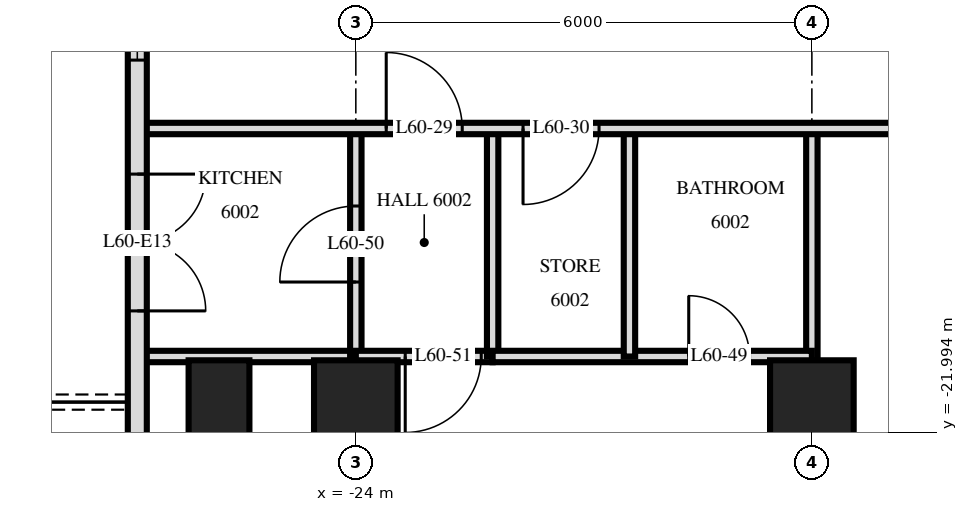
"""IFC4 building model, lengths in metres.
Left out: names, types, materials, properties, quantities, classifications, styles, units other than length and angle.
Written with IfcOpenShell. Run it as: python <this file> out.ifc"""

import sys

from ifc_helpers import new_model, si_unit, direction, frame, frame_2d, origin, origin_2d, place, context, subcontext, project, spatial, rectangle, extrude, element, fill, save


model = new_model("IFC4")
c1 = context("Model", 3, precision=1e-05, world=origin(), true_north=direction((0.0, 1.0)))
c2 = subcontext(c1, "Body", "Model", "MODEL_VIEW")
j1 = project(units=[si_unit("LENGTHUNIT", "METRE"), si_unit("PLANEANGLEUNIT", "RADIAN")], contexts=[c1])
p1 = place(None, origin())
s1 = spatial("IfcSite", under=j1, at=p1, CompositionType="ELEMENT")
p2 = place(p1, origin())
s2 = spatial("IfcBuilding", under=s1, at=p2, CompositionType="ELEMENT")
p3 = place(p2, frame((0.0, 0.0, 229.1)))
s3 = spatial("IfcBuildingStorey", under=s2, at=p3, CompositionType="ELEMENT", Elevation=229.1)
p4 = place(p3, frame((-25.8, -21.6, 0.0), z_axis=(0.0, 0.0, 1.0), x_axis=(0.0, 1.0, 0.0)))
e1 = element("IfcColumn", 1, at=p4, inside=s3, PredefinedType="COLUMN", context=c2, shape_type="SweptSolid", body=[
    extrude(rectangle(XDim=1.1, YDim=0.8, at=origin_2d()), origin(), (0.0, 0.0, 1.0), 3.5),
])
for number, where, z_axis, x_axis in (
    (2, (-24.0, -21.6, 0.0), (0.0, 0.0, 1.0), (1.0, 0.0, 0.0)),
    (3, (-18.0, -21.6, 0.0), (0.0, 0.0, 1.0), (1.0, 0.0, 0.0)),
):
    element("IfcColumn", number, at=place(p3, frame(where, z_axis=z_axis, x_axis=x_axis)), inside=s3, PredefinedType="COLUMN", context=c2, shape_type="SweptSolid", body=[
        extrude(rectangle(XDim=1.1, YDim=1.1, at=origin_2d()), origin(), (0.0, 0.0, 1.0), 3.5),
    ])
p5 = place(p3, frame((-26.875, -3.325, 0.0), z_axis=(0.0, 0.0, 1.0), x_axis=(0.0, -1.0, 0.0)))
e4 = element("IfcWall", 4, at=p5, inside=s3, PredefinedType="SOLIDWALL", context=c2, shape_type="SweptSolid", body=[
    extrude(rectangle(XDim=21.551, YDim=0.25, at=frame_2d((10.775, 0.0))), origin(), (0.0, 0.0, 1.0), 3.22),
])
p6 = place(p5, frame((6.575, 0.0, 0.0)))
e5 = element("IfcOpeningElement", 5, at=p6, cuts=e4, PredefinedType="OPENING", context=c2, shape_type="SweptSolid", body=[
    extrude(rectangle(XDim=1.8, YDim=2.4, at=frame_2d((0.9, 1.2))), frame((0.0, 0.135, 0.0), z_axis=(0.0, -1.0, 0.0), x_axis=(1.0, 0.0, 0.0)), (0.0, 0.0, 1.0), 0.27),
])
p7 = place(p5, frame((9.425, 0.0, 0.9)))
e6 = element("IfcOpeningElement", 6, at=p7, cuts=e4, PredefinedType="OPENING", context=c2, shape_type="SweptSolid", body=[
    extrude(rectangle(XDim=1.8, YDim=1.5, at=frame_2d((0.9, 0.75))), frame((0.0, 0.135, 0.0), z_axis=(0.0, -1.0, 0.0), x_axis=(1.0, 0.0, 0.0)), (0.0, 0.0, 1.0), 0.27),
])
p8 = place(p5, frame((12.575, 0.0, 0.9)))
e7 = element("IfcOpeningElement", 7, at=p8, cuts=e4, PredefinedType="OPENING", context=c2, shape_type="SweptSolid", body=[
    extrude(rectangle(XDim=1.2, YDim=1.5, at=frame_2d((0.6, 0.75))), frame((0.0, 0.135, 0.0), z_axis=(0.0, -1.0, 0.0), x_axis=(1.0, 0.0, 0.0)), (0.0, 0.0, 1.0), 0.27),
])
p9 = place(p5, frame((15.275, 0.0, 0.0)))
e8 = element("IfcOpeningElement", 8, at=p9, cuts=e4, PredefinedType="OPENING", context=c2, shape_type="SweptSolid", body=[
    extrude(rectangle(XDim=1.8, YDim=2.4, at=frame_2d((0.9, 1.2))), frame((0.0, 0.135, 0.0), z_axis=(0.0, -1.0, 0.0), x_axis=(1.0, 0.0, 0.0)), (0.0, 0.0, 1.0), 0.27),
])
p10 = place(p5, frame((18.875, 0.0, 0.0)))
e9 = element("IfcOpeningElement", 9, at=p10, cuts=e4, PredefinedType="OPENING", context=c2, shape_type="SweptSolid", body=[
    extrude(rectangle(XDim=1.8, YDim=2.4, at=frame_2d((0.9, 1.2))), frame((0.0, 0.135, 0.0), z_axis=(0.0, -1.0, 0.0), x_axis=(1.0, 0.0, 0.0)), (0.0, 0.0, 1.0), 0.27),
])
p11 = place(p3, frame((-18.0, -29.22, 0.0), z_axis=(0.0, 0.0, 1.0), x_axis=(0.0, 1.0, 0.0)))
e10 = element("IfcWall", 10, at=p11, inside=s3, PredefinedType="PARTITIONING", context=c2, shape_type="SweptSolid", body=[
    extrude(rectangle(XDim=11.22, YDim=0.15, at=frame_2d((5.61, 0.0))), origin(), (0.0, 0.0, 1.0), 3.22),
])
for number, where, z_axis, x_axis in (
    (11, (-20.4, -21.0, 0.0), (0.0, 0.0, 1.0), (0.0, 1.0, 0.0)),
    (12, (-22.2, -21.0, 0.0), (0.0, 0.0, 1.0), (0.0, 1.0, 0.0)),
):
    element("IfcWall", number, at=place(p3, frame(where, z_axis=z_axis, x_axis=x_axis)), inside=s3, PredefinedType="PARTITIONING", context=c2, shape_type="SweptSolid", body=[
        extrude(rectangle(XDim=3.0, YDim=0.15, at=frame_2d((1.5, 0.0))), origin(), (0.0, 0.0, 1.0), 3.22),
    ])
p12 = place(p3, frame((-24.0, -21.0, 0.0), z_axis=(0.0, 0.0, 1.0), x_axis=(0.0, 1.0, 0.0)))
e13 = element("IfcWall", 13, at=p12, inside=s3, PredefinedType="PARTITIONING", context=c2, shape_type="SweptSolid", body=[
    extrude(rectangle(XDim=3.0, YDim=0.15, at=frame_2d((1.5, 0.0))), origin(), (0.0, 0.0, 1.0), 3.22),
])
p13 = place(p12, frame((0.98, 0.0, 0.0)))
e14 = element("IfcOpeningElement", 14, at=p13, cuts=e13, PredefinedType="OPENING", context=c2, shape_type="SweptSolid", body=[
    extrude(rectangle(XDim=1.0, YDim=2.1, at=frame_2d((0.5, 1.05))), frame((0.0, 0.085, 0.0), z_axis=(0.0, -1.0, 0.0), x_axis=(1.0, 0.0, 0.0)), (0.0, 0.0, 1.0), 0.17),
])
p14 = place(p3, frame((-24.0, -28.918, 0.0), z_axis=(0.0, 0.0, 1.0), x_axis=(0.0, 1.0, 0.0)))
e15 = element("IfcWall", 15, at=p14, inside=s3, PredefinedType="PARTITIONING", context=c2, shape_type="SweptSolid", body=[
    extrude(rectangle(XDim=7.918, YDim=0.15, at=frame_2d((3.959, 0.0))), origin(), (0.0, 0.0, 1.0), 3.22),
])
p15 = place(p14, frame((3.436, 0.0, 0.0)))
e16 = element("IfcOpeningElement", 16, at=p15, cuts=e15, PredefinedType="OPENING", context=c2, shape_type="SweptSolid", body=[
    extrude(rectangle(XDim=0.9, YDim=2.1, at=frame_2d((0.45, 1.05))), frame((0.0, 0.085, 0.0), z_axis=(0.0, -1.0, 0.0), x_axis=(1.0, 0.0, 0.0)), (0.0, 0.0, 1.0), 0.17),
])
p16 = place(p3, frame((-24.0, -21.0, 0.0), z_axis=(0.0, 0.0, 1.0), x_axis=(1.0, 0.0, 0.0)))
e17 = element("IfcWall", 17, at=p16, inside=s3, PredefinedType="PARTITIONING", context=c2, shape_type="SweptSolid", body=[
    extrude(rectangle(XDim=1.8, YDim=0.15, at=frame_2d((0.9, 0.0))), origin(), (0.0, 0.0, 1.0), 3.22),
])
p17 = place(p16, frame((0.65, 0.0, 0.0)))
e18 = element("IfcOpeningElement", 18, at=p17, cuts=e17, PredefinedType="OPENING", context=c2, shape_type="SweptSolid", body=[
    extrude(rectangle(XDim=1.0, YDim=2.1, at=frame_2d((0.5, 1.05))), frame((0.0, 0.085, 0.0), z_axis=(0.0, -1.0, 0.0), x_axis=(1.0, 0.0, 0.0)), (0.0, 0.0, 1.0), 0.17),
])
p18 = place(p3, frame((-26.82, -21.0, 0.0), z_axis=(0.0, 0.0, 1.0), x_axis=(1.0, 0.0, 0.0)))
e19 = element("IfcWall", 19, at=p18, inside=s3, PredefinedType="PARTITIONING", context=c2, shape_type="SweptSolid", body=[
    extrude(rectangle(XDim=2.82, YDim=0.15, at=frame_2d((1.41, 0.0))), origin(), (0.0, 0.0, 1.0), 3.22),
])
p19 = place(p3, frame((-22.2, -21.0, 0.0), z_axis=(0.0, 0.0, 1.0), x_axis=(1.0, 0.0, 0.0)))
e20 = element("IfcWall", 20, at=p19, inside=s3, PredefinedType="PARTITIONING", context=c2, shape_type="SweptSolid", body=[
    extrude(rectangle(XDim=4.2, YDim=0.15, at=frame_2d((2.1, 0.0))), origin(), (0.0, 0.0, 1.0), 3.22),
])
p20 = place(p19, frame((2.58, 0.0, 0.0)))
e21 = element("IfcOpeningElement", 21, at=p20, cuts=e20, PredefinedType="OPENING", context=c2, shape_type="SweptSolid", body=[
    extrude(rectangle(XDim=0.8, YDim=2.1, at=frame_2d((0.4, 1.05))), frame((0.0, 0.085, 0.0), z_axis=(0.0, -1.0, 0.0), x_axis=(1.0, 0.0, 0.0)), (0.0, 0.0, 1.0), 0.17),
])
p21 = place(p3, frame((-26.82, -18.0, 0.0), z_axis=(0.0, 0.0, 1.0), x_axis=(1.0, 0.0, 0.0)))
e22 = element("IfcWall", 22, at=p21, inside=s3, PredefinedType="PARTITIONING", context=c2, shape_type="SweptSolid", body=[
    extrude(rectangle(XDim=53.64, YDim=0.15, at=frame_2d((26.82, 0.0))), origin(), (0.0, 0.0, 1.0), 3.22),
])
p22 = place(p21, frame((11.32, 0.0, 0.0)))
e23 = element("IfcOpeningElement", 23, at=p22, cuts=e22, PredefinedType="OPENING", context=c2, shape_type="SweptSolid", body=[
    extrude(rectangle(XDim=1.0, YDim=2.1, at=frame_2d((0.5, 1.05))), frame((0.0, 0.085, 0.0), z_axis=(0.0, -1.0, 0.0), x_axis=(1.0, 0.0, 0.0)), (0.0, 0.0, 1.0), 0.17),
])
p23 = place(p21, frame((3.22, 0.0, 0.0)))
e24 = element("IfcOpeningElement", 24, at=p23, cuts=e22, PredefinedType="OPENING", context=c2, shape_type="SweptSolid", body=[
    extrude(rectangle(XDim=1.0, YDim=2.1, at=frame_2d((0.5, 1.05))), frame((0.0, 0.085, 0.0), z_axis=(0.0, -1.0, 0.0), x_axis=(1.0, 0.0, 0.0)), (0.0, 0.0, 1.0), 0.17),
])
p24 = place(p21, frame((5.02, 0.0, 0.0)))
e25 = element("IfcOpeningElement", 25, at=p24, cuts=e22, PredefinedType="OPENING", context=c2, shape_type="SweptSolid", body=[
    extrude(rectangle(XDim=1.0, YDim=2.1, at=frame_2d((0.5, 1.05))), frame((0.0, 0.085, 0.0), z_axis=(0.0, -1.0, 0.0), x_axis=(1.0, 0.0, 0.0)), (0.0, 0.0, 1.0), 0.17),
])
p25 = place(p21, frame((38.97, 0.0, 0.0)))
e26 = element("IfcOpeningElement", 26, at=p25, cuts=e22, PredefinedType="OPENING", context=c2, shape_type="SweptSolid", body=[
    extrude(rectangle(XDim=1.0, YDim=2.1, at=frame_2d((0.5, 1.05))), frame((0.0, 0.085, 0.0), z_axis=(0.0, -1.0, 0.0), x_axis=(1.0, 0.0, 0.0)), (0.0, 0.0, 1.0), 0.17),
])
p26 = place(p21, frame((48.72, 0.0, 0.0)))
e27 = element("IfcOpeningElement", 27, at=p26, cuts=e22, PredefinedType="OPENING", context=c2, shape_type="SweptSolid", body=[
    extrude(rectangle(XDim=1.0, YDim=2.1, at=frame_2d((0.5, 1.05))), frame((0.0, 0.085, 0.0), z_axis=(0.0, -1.0, 0.0), x_axis=(1.0, 0.0, 0.0)), (0.0, 0.0, 1.0), 0.17),
])
p27 = place(p21, frame((46.92, 0.0, 0.0)))
e28 = element("IfcOpeningElement", 28, at=p27, cuts=e22, PredefinedType="OPENING", context=c2, shape_type="SweptSolid", body=[
    extrude(rectangle(XDim=1.0, YDim=2.1, at=frame_2d((0.5, 1.05))), frame((0.0, 0.085, 0.0), z_axis=(0.0, -1.0, 0.0), x_axis=(1.0, 0.0, 0.0)), (0.0, 0.0, 1.0), 0.17),
])
p28 = place(p21, frame((18.82, 0.0, 0.0)))
e29 = element("IfcOpeningElement", 29, at=p28, cuts=e22, PredefinedType="OPENING", context=c2, shape_type="SweptSolid", body=[
    extrude(rectangle(XDim=1.0, YDim=2.1, at=frame_2d((0.5, 1.05))), frame((0.0, 0.085, 0.0), z_axis=(0.0, -1.0, 0.0), x_axis=(1.0, 0.0, 0.0)), (0.0, 0.0, 1.0), 0.17),
])
p29 = place(p21, frame((27.82, 0.0, 0.0)))
e30 = element("IfcOpeningElement", 30, at=p29, cuts=e22, PredefinedType="OPENING", context=c2, shape_type="SweptSolid", body=[
    extrude(rectangle(XDim=1.0, YDim=2.1, at=frame_2d((0.5, 1.05))), frame((0.0, 0.085, 0.0), z_axis=(0.0, -1.0, 0.0), x_axis=(1.0, 0.0, 0.0)), (0.0, 0.0, 1.0), 0.17),
])
p30 = place(p21, frame((35.32, 0.0, 0.0)))
e31 = element("IfcOpeningElement", 31, at=p30, cuts=e22, PredefinedType="OPENING", context=c2, shape_type="SweptSolid", body=[
    extrude(rectangle(XDim=1.0, YDim=2.1, at=frame_2d((0.5, 1.05))), frame((0.0, 0.085, 0.0), z_axis=(0.0, -1.0, 0.0), x_axis=(1.0, 0.0, 0.0)), (0.0, 0.0, 1.0), 0.17),
])
p31 = place(p8, origin())
e32 = element("IfcWindow", 32, at=p31, inside=s3, PartitioningType="SINGLE_PANEL", PredefinedType="WINDOW", context=c2, shape_type="SweptSolid", body=[
    extrude(rectangle(XDim=1.2, YDim=1.5, at=frame_2d((0.6, 0.75))), frame((0.0, 0.03, 0.0), z_axis=(0.0, -1.0, 0.0), x_axis=(1.0, 0.0, 0.0)), (0.0, 0.0, 1.0), 0.06),
])
fill(e7, e32)
p32 = place(p9, origin())
e33 = element("IfcDoor", 33, at=p32, inside=s3, OperationType="DOUBLE_DOOR_SINGLE_SWING", PredefinedType="DOOR", context=c2, shape_type="SweptSolid", body=[
    extrude(rectangle(XDim=1.8, YDim=2.4, at=frame_2d((0.9, 1.2))), frame((0.0, 0.025, 0.0), z_axis=(0.0, -1.0, 0.0), x_axis=(1.0, 0.0, 0.0)), (0.0, 0.0, 1.0), 0.05),
])
fill(e8, e33)
p33 = place(p23, origin())
e34 = element("IfcDoor", 34, at=p33, inside=s3, OperationType="SINGLE_SWING_RIGHT", PredefinedType="DOOR", context=c2, shape_type="SweptSolid", body=[
    extrude(rectangle(XDim=1.0, YDim=2.1, at=frame_2d((0.5, 1.05))), frame((0.0, 0.025, 0.0), z_axis=(0.0, -1.0, 0.0), x_axis=(1.0, 0.0, 0.0)), (0.0, 0.0, 1.0), 0.05),
])
fill(e24, e34)
p34 = place(p24, frame((0.5, 0.0, 0.0), z_axis=(0.0, 0.0, 1.0), x_axis=(-1.0, 0.0, 0.0)))
e35 = element("IfcDoor", 35, at=p34, inside=s3, OperationType="SINGLE_SWING_LEFT", PredefinedType="DOOR", context=c2, shape_type="SweptSolid", body=[
    extrude(rectangle(XDim=1.0, YDim=2.1, at=frame_2d((0.0, 1.05))), frame((0.0, -0.025, 0.0), z_axis=(0.0, 1.0, 0.0), x_axis=(-1.0, 0.0, 0.0)), (0.0, 0.0, 1.0), 0.05),
])
fill(e25, e35)
p35 = place(p20, origin())
e36 = element("IfcDoor", 36, at=p35, inside=s3, OperationType="SINGLE_SWING_RIGHT", PredefinedType="DOOR", context=c2, shape_type="SweptSolid", body=[
    extrude(rectangle(XDim=0.8, YDim=2.1, at=frame_2d((0.4, 1.05))), frame((0.0, 0.025, 0.0), z_axis=(0.0, -1.0, 0.0), x_axis=(1.0, 0.0, 0.0)), (0.0, 0.0, 1.0), 0.05),
])
fill(e21, e36)
p36 = place(p13, origin())
e37 = element("IfcDoor", 37, at=p36, inside=s3, OperationType="SINGLE_SWING_RIGHT", PredefinedType="DOOR", context=c2, shape_type="SweptSolid", body=[
    extrude(rectangle(XDim=1.0, YDim=2.1, at=frame_2d((0.5, 1.05))), frame((0.0, 0.025, 0.0), z_axis=(0.0, -1.0, 0.0), x_axis=(1.0, 0.0, 0.0)), (0.0, 0.0, 1.0), 0.05),
])
fill(e14, e37)
p37 = place(p17, frame((0.5, 0.0, 0.0), z_axis=(0.0, 0.0, 1.0), x_axis=(-1.0, 0.0, 0.0)))
e38 = element("IfcDoor", 38, at=p37, inside=s3, OperationType="SINGLE_SWING_LEFT", PredefinedType="DOOR", context=c2, shape_type="SweptSolid", body=[
    extrude(rectangle(XDim=1.0, YDim=2.1, at=frame_2d((0.0, 1.05))), frame((0.0, -0.025, 0.0), z_axis=(0.0, 1.0, 0.0), x_axis=(-1.0, 0.0, 0.0)), (0.0, 0.0, 1.0), 0.05),
])
fill(e18, e38)
save(model, sys.argv[1])
